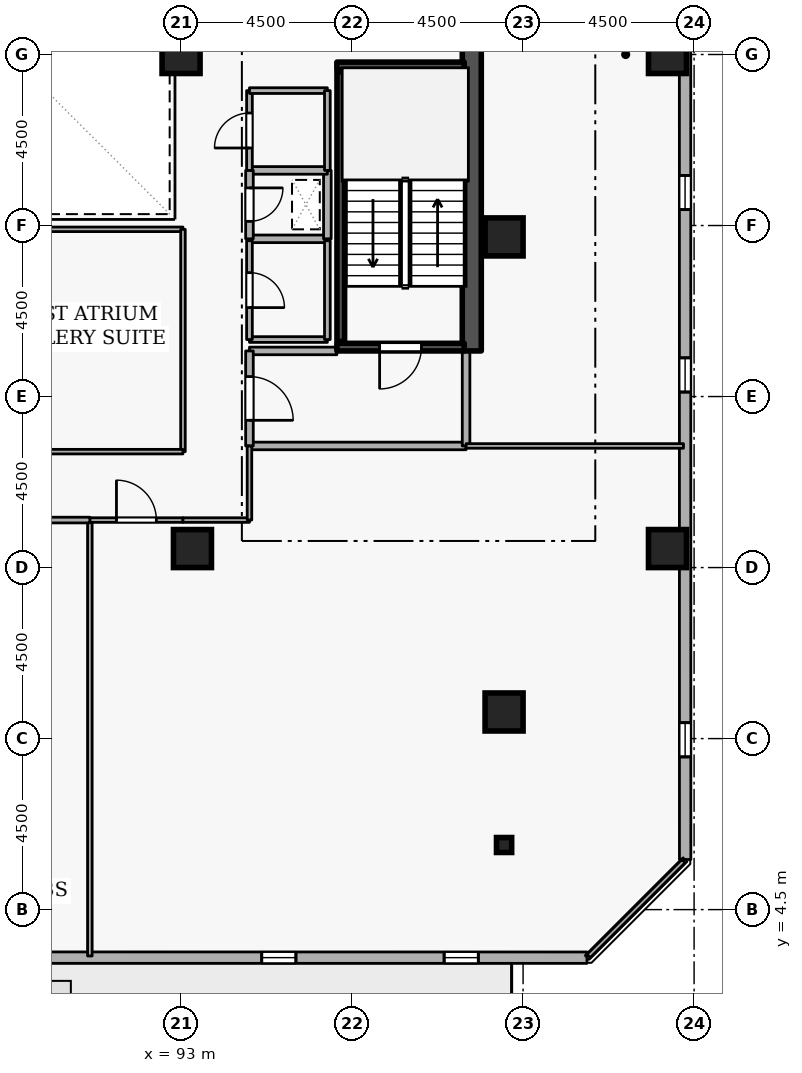
"""IFC4 building model, lengths in metres.
Left out: names, types, materials, properties, quantities, classifications, styles, units other than length and angle.
Written with IfcOpenShell. Run it as: python <this file> out.ifc"""

import sys

from ifc_helpers import new_model, si_unit, direction, frame, frame_2d, origin, origin_2d, place, context, subcontext, project, spatial, rectangle, i_section, extrude, element, fill, save


model = new_model("IFC4")
c1 = context("Model", 3, precision=1e-05, world=origin(), true_north=direction((0.0, 1.0)))
c2 = subcontext(c1, "Body", "Model", "MODEL_VIEW")
j1 = project(units=[si_unit("LENGTHUNIT", "METRE"), si_unit("PLANEANGLEUNIT", "RADIAN")], contexts=[c1])
p1 = place(None, origin())
s1 = spatial("IfcSite", under=j1, at=p1, CompositionType="ELEMENT")
p2 = place(p1, origin())
s2 = spatial("IfcBuilding", under=s1, at=p2, CompositionType="ELEMENT")
p3 = place(p2, frame((0.0, 0.0, 207.3)))
s3 = spatial("IfcBuildingStorey", under=s2, at=p3, CompositionType="ELEMENT", Elevation=207.3)
p4 = place(p3, frame((100.65, 19.2, 0.0), z_axis=(0.0, 0.0, 1.0), x_axis=(0.0, 1.0, 0.0)))
e1 = element("IfcWall", 1, at=p4, inside=s3, PredefinedType="SHEAR", context=c2, shape_type="SweptSolid", body=[
    extrude(rectangle(XDim=15.6, YDim=0.5, at=frame_2d((7.8, 0.0))), origin(), (0.0, 0.0, 1.0), 3.6),
])
for number, where, z_axis, x_axis in (
    (2, (105.8, 14.0, 0.0), (0.0, 0.0, 1.0), (1.0, 0.0, 0.0)),
    (3, (105.8, 27.0, 0.0), (0.0, 0.0, 1.0), (1.0, 0.0, 0.0)),
    (4, (101.5, 9.7, 0.0), (0.0, 0.0, 1.0), (1.0, 0.0, 0.0)),
    (5, (93.3, 14.0, 0.0), (0.0, 0.0, 1.0), (1.0, 0.0, 0.0)),
    (6, (101.5, 22.2, 0.0), (0.0, 0.0, 1.0), (1.0, 0.0, 0.0)),
    (7, (93.0, 27.0, 0.0), (0.0, 0.0, 1.0), (1.0, 0.0, 0.0)),
):
    element("IfcColumn", number, at=place(p3, frame(where, z_axis=z_axis, x_axis=x_axis)), inside=s3, PredefinedType="COLUMN", context=c2, shape_type="SweptSolid", body=[
        extrude(rectangle(XDim=1.0, YDim=1.0, at=origin_2d()), origin(), (0.0, 0.0, 1.0), 3.6),
    ])
p5 = place(p3, frame((101.5, 6.2, 0.0), z_axis=(0.0, 0.0, 1.0), x_axis=(1.0, 0.0, 0.0)))
e8 = element("IfcColumn", 8, at=p5, inside=s3, PredefinedType="COLUMN", context=c2, shape_type="SweptSolid", body=[
    extrude(i_section(OverallWidth=0.399, OverallDepth=0.394, WebThickness=0.023, FlangeThickness=0.037, FilletRadius=0.015, at=origin_2d()), origin(), (0.0, 0.0, 1.0), 3.6),
])
p6 = place(p3, frame((68.422, 3.239, 0.0), z_axis=(0.0, 0.0, 1.0), x_axis=(0.999999994606, -0.000103863011, 0.0)))
e9 = element("IfcWall", 9, at=p6, inside=s3, PredefinedType="STANDARD", context=c2, shape_type="SweptSolid", body=[
    extrude(rectangle(XDim=35.259, YDim=0.3, at=frame_2d((17.629, 0.0))), origin(), (0.0, 0.0, 1.0), 2.7),
])
p7 = place(p6, frame((19.43, 0.0, 0.0)))
e10 = element("IfcOpeningElement", 10, at=p7, cuts=e9, PredefinedType="OPENING", context=c2, shape_type="SweptSolid", body=[
    extrude(rectangle(XDim=1.0, YDim=2.08, at=frame_2d((0.5, 1.04))), frame((0.0, 0.16, 0.0), z_axis=(0.0, -1.0, 0.0), x_axis=(1.0, 0.0, 0.0)), (0.0, 0.0, 1.0), 0.32),
])
p8 = place(p6, frame((2.7, 0.0, 0.72)))
e11 = element("IfcOpeningElement", 11, at=p8, cuts=e9, PredefinedType="OPENING", context=c2, shape_type="SweptSolid", body=[
    extrude(rectangle(XDim=0.9, YDim=1.75, at=frame_2d((0.45, 0.875))), frame((0.0, 0.16, 0.0), z_axis=(0.0, -1.0, 0.0), x_axis=(1.0, 0.0, 0.0)), (0.0, 0.0, 1.0), 0.32),
])
p9 = place(p6, frame((7.5, 0.0, 0.72)))
e12 = element("IfcOpeningElement", 12, at=p9, cuts=e9, PredefinedType="OPENING", context=c2, shape_type="SweptSolid", body=[
    extrude(rectangle(XDim=0.9, YDim=1.75, at=frame_2d((0.45, 0.875))), frame((0.0, 0.16, 0.0), z_axis=(0.0, -1.0, 0.0), x_axis=(1.0, 0.0, 0.0)), (0.0, 0.0, 1.0), 0.32),
])
p10 = place(p6, frame((12.3, 0.0, 0.72)))
e13 = element("IfcOpeningElement", 13, at=p10, cuts=e9, PredefinedType="OPENING", context=c2, shape_type="SweptSolid", body=[
    extrude(rectangle(XDim=0.9, YDim=1.75, at=frame_2d((0.45, 0.875))), frame((0.0, 0.16, 0.0), z_axis=(0.0, -1.0, 0.0), x_axis=(1.0, 0.0, 0.0)), (0.0, 0.0, 1.0), 0.32),
])
p11 = place(p6, frame((26.7, 0.0, 0.72)))
e14 = element("IfcOpeningElement", 14, at=p11, cuts=e9, PredefinedType="OPENING", context=c2, shape_type="SweptSolid", body=[
    extrude(rectangle(XDim=0.9, YDim=1.75, at=frame_2d((0.45, 0.875))), frame((0.0, 0.16, 0.0), z_axis=(0.0, -1.0, 0.0), x_axis=(1.0, 0.0, 0.0)), (0.0, 0.0, 1.0), 0.32),
])
p12 = place(p6, frame((31.5, 0.0, 0.72)))
e15 = element("IfcOpeningElement", 15, at=p12, cuts=e9, PredefinedType="OPENING", context=c2, shape_type="SweptSolid", body=[
    extrude(rectangle(XDim=0.9, YDim=1.75, at=frame_2d((0.45, 0.875))), frame((0.0, 0.16, 0.0), z_axis=(0.0, -1.0, 0.0), x_axis=(1.0, 0.0, 0.0)), (0.0, 0.0, 1.0), 0.32),
])
p13 = place(p3, frame((106.265, 5.819, 0.0), z_axis=(0.0, 0.0, 1.0), x_axis=(-0.000103863011, 0.999999994606, 0.0)))
e16 = element("IfcWall", 16, at=p13, inside=s3, PredefinedType="STANDARD", context=c2, shape_type="SweptSolid", body=[
    extrude(rectangle(XDim=35.259, YDim=0.3, at=frame_2d((17.629, 0.0))), origin(), (0.0, 0.0, 1.0), 2.7),
])
p14 = place(p13, frame((2.7, 0.0, 0.72)))
e17 = element("IfcOpeningElement", 17, at=p14, cuts=e16, PredefinedType="OPENING", context=c2, shape_type="SweptSolid", body=[
    extrude(rectangle(XDim=0.9, YDim=1.75, at=frame_2d((0.45, 0.875))), frame((0.0, 0.16, 0.0), z_axis=(0.0, -1.0, 0.0), x_axis=(1.0, 0.0, 0.0)), (0.0, 0.0, 1.0), 0.32),
])
p15 = place(p13, frame((12.3, 0.0, 0.72)))
e18 = element("IfcOpeningElement", 18, at=p15, cuts=e16, PredefinedType="OPENING", context=c2, shape_type="SweptSolid", body=[
    extrude(rectangle(XDim=0.9, YDim=1.75, at=frame_2d((0.45, 0.875))), frame((0.0, 0.16, 0.0), z_axis=(0.0, -1.0, 0.0), x_axis=(1.0, 0.0, 0.0)), (0.0, 0.0, 1.0), 0.32),
])
p16 = place(p13, frame((17.1, 0.0, 0.72)))
e19 = element("IfcOpeningElement", 19, at=p16, cuts=e16, PredefinedType="OPENING", context=c2, shape_type="SweptSolid", body=[
    extrude(rectangle(XDim=0.9, YDim=1.75, at=frame_2d((0.45, 0.875))), frame((0.0, 0.16, 0.0), z_axis=(0.0, -1.0, 0.0), x_axis=(1.0, 0.0, 0.0)), (0.0, 0.0, 1.0), 0.32),
])
p17 = place(p13, frame((26.7, 0.0, 0.72)))
e20 = element("IfcOpeningElement", 20, at=p17, cuts=e16, PredefinedType="OPENING", context=c2, shape_type="SweptSolid", body=[
    extrude(rectangle(XDim=0.9, YDim=1.75, at=frame_2d((0.45, 0.875))), frame((0.0, 0.16, 0.0), z_axis=(0.0, -1.0, 0.0), x_axis=(1.0, 0.0, 0.0)), (0.0, 0.0, 1.0), 0.32),
])
p18 = place(p3, frame((100.45, 19.3, 0.0), z_axis=(0.0, 0.0, 1.0), x_axis=(-1.0, 0.0, 0.0)))
e21 = element("IfcWall", 21, at=p18, inside=s3, PredefinedType="SHEAR", context=c2, shape_type="SweptSolid", body=[
    extrude(rectangle(XDim=3.35, YDim=0.2, at=frame_2d((1.675, 0.0))), origin(), (0.0, 0.0, 1.0), 3.6),
])
p19 = place(p18, frame((1.125, 0.0, 0.0)))
e22 = element("IfcOpeningElement", 22, at=p19, cuts=e21, PredefinedType="OPENING", context=c2, shape_type="SweptSolid", body=[
    extrude(rectangle(XDim=1.1, YDim=2.1, at=frame_2d((0.55, 1.05))), frame((0.0, 0.11, 0.0), z_axis=(0.0, -1.0, 0.0), x_axis=(1.0, 0.0, 0.0)), (0.0, 0.0, 1.0), 0.22),
])
p20 = place(p3, frame((97.1, 26.7, 0.0), z_axis=(0.0, 0.0, 1.0), x_axis=(1.0, 0.0, 0.0)))
e23 = element("IfcWall", 23, at=p20, inside=s3, PredefinedType="SHEAR", context=c2, shape_type="SweptSolid", body=[
    extrude(rectangle(XDim=3.35, YDim=0.2, at=frame_2d((1.675, 0.0))), origin(), (0.0, 0.0, 1.0), 3.6),
])
p21 = place(p3, frame((97.203, 26.55, 0.0), z_axis=(0.0, 0.0, 1.0), x_axis=(0.0, -1.0, 0.0)))
e24 = element("IfcWall", 24, at=p21, inside=s3, PredefinedType="SHEAR", context=c2, shape_type="SweptSolid", body=[
    extrude(rectangle(XDim=7.1, YDim=0.2, at=frame_2d((3.55, 0.0))), origin(), (0.0, 0.0, 1.0), 3.6),
])
p22 = place(p3, frame((94.8, 16.7, 0.0), z_axis=(0.0, 0.0, 1.0), x_axis=(1.0, 0.0, 0.0)))
e25 = element("IfcWall", 25, at=p22, inside=s3, PredefinedType="STANDARD", context=c2, shape_type="SweptSolid", body=[
    extrude(rectangle(XDim=5.7, YDim=0.2, at=frame_2d((2.85, 0.0))), origin(), (0.0, 0.0, 1.0), 3.34),
])
p23 = place(p3, frame((100.5, 16.7, 0.0), z_axis=(0.0, 0.0, 1.0), x_axis=(0.0, 1.0, 0.0)))
e26 = element("IfcWall", 26, at=p23, inside=s3, PredefinedType="STANDARD", context=c2, shape_type="SweptSolid", body=[
    extrude(rectangle(XDim=2.5, YDim=0.2, at=frame_2d((1.25, 0.0))), origin(), (0.0, 0.0, 1.0), 3.34),
])
p24 = place(p3, frame((97.1, 19.2, 0.0), z_axis=(0.0, 0.0, 1.0), x_axis=(-1.0, 0.0, 0.0)))
e27 = element("IfcWall", 27, at=p24, inside=s3, PredefinedType="STANDARD", context=c2, shape_type="SweptSolid", body=[
    extrude(rectangle(XDim=2.3, YDim=0.2, at=frame_2d((1.15, 0.0))), origin(), (0.0, 0.0, 1.0), 2.545),
])
p25 = place(p3, frame((94.8, 19.2, 0.0), z_axis=(0.0, 0.0, 1.0), x_axis=(0.0, -1.0, 0.0)))
e28 = element("IfcWall", 28, at=p25, inside=s3, PredefinedType="STANDARD", context=c2, shape_type="SweptSolid", body=[
    extrude(rectangle(XDim=2.5, YDim=0.2, at=frame_2d((1.25, 0.0))), origin(), (0.0, 0.0, 1.0), 3.34),
])
p26 = place(p25, frame((0.675, 0.0, 0.0)))
e29 = element("IfcOpeningElement", 29, at=p26, cuts=e28, PredefinedType="OPENING", context=c2, shape_type="SweptSolid", body=[
    extrude(rectangle(XDim=1.15, YDim=2.1, at=frame_2d((0.575, 1.05))), frame((0.0, 0.11, 0.0), z_axis=(0.0, -1.0, 0.0), x_axis=(1.0, 0.0, 0.0)), (0.0, 0.0, 1.0), 0.22),
])
p27 = place(p3, frame((94.8, 22.15, 0.0), z_axis=(0.0, 0.0, 1.0), x_axis=(1.0, 0.0, 0.0)))
e30 = element("IfcWall", 30, at=p27, inside=s3, PredefinedType="STANDARD", context=c2, shape_type="SweptSolid", body=[
    extrude(rectangle(XDim=2.05, YDim=0.2, at=frame_2d((1.025, 0.0))), origin(), (0.0, 0.0, 1.0), 3.34),
])
p28 = place(p3, frame((96.85, 22.15, 0.0), z_axis=(0.0, 0.0, 1.0), x_axis=(0.0, 1.0, 0.0)))
e31 = element("IfcWall", 31, at=p28, inside=s3, PredefinedType="STANDARD", context=c2, shape_type="SweptSolid", body=[
    extrude(rectangle(XDim=1.8, YDim=0.2, at=frame_2d((0.9, 0.0))), origin(), (0.0, 0.0, 1.0), 3.34),
])
p29 = place(p3, frame((96.85, 23.95, 0.0), z_axis=(0.0, 0.0, 1.0), x_axis=(-1.0, 0.0, 0.0)))
e32 = element("IfcWall", 32, at=p29, inside=s3, PredefinedType="STANDARD", context=c2, shape_type="SweptSolid", body=[
    extrude(rectangle(XDim=2.05, YDim=0.2, at=frame_2d((1.025, 0.0))), origin(), (0.0, 0.0, 1.0), 3.34),
])
p30 = place(p3, frame((94.8, 23.95, 0.0), z_axis=(0.0, 0.0, 1.0), x_axis=(0.0, -1.0, 0.0)))
e33 = element("IfcWall", 33, at=p30, inside=s3, PredefinedType="STANDARD", context=c2, shape_type="SweptSolid", body=[
    extrude(rectangle(XDim=1.8, YDim=0.2, at=frame_2d((0.9, 0.0))), origin(), (0.0, 0.0, 1.0), 3.34),
])
p31 = place(p30, frame((0.46, 0.0, 0.0)))
e34 = element("IfcOpeningElement", 34, at=p31, cuts=e33, PredefinedType="OPENING", context=c2, shape_type="SweptSolid", body=[
    extrude(rectangle(XDim=0.88, YDim=2.04, at=frame_2d((0.44, 1.02))), frame((0.0, 0.11, 0.0), z_axis=(0.0, -1.0, 0.0), x_axis=(1.0, 0.0, 0.0)), (0.0, 0.0, 1.0), 0.22),
])
p32 = place(p3, frame((94.8, 19.5, 0.0), z_axis=(0.0, 0.0, 1.0), x_axis=(1.0, 0.0, 0.0)))
e35 = element("IfcWall", 35, at=p32, inside=s3, PredefinedType="PARTITIONING", context=c2, shape_type="SweptSolid", body=[
    extrude(rectangle(XDim=2.05, YDim=0.15, at=frame_2d((1.025, 0.0))), origin(), (0.0, 0.0, 1.0), 2.545),
])
p33 = place(p3, frame((96.85, 19.5, 0.0), z_axis=(0.0, 0.0, 1.0), x_axis=(0.0, 1.0, 0.0)))
e36 = element("IfcWall", 36, at=p33, inside=s3, PredefinedType="PARTITIONING", context=c2, shape_type="SweptSolid", body=[
    extrude(rectangle(XDim=2.6, YDim=0.15, at=frame_2d((1.3, 0.0))), origin(), (0.0, 0.0, 1.0), 3.34),
])
p34 = place(p3, frame((94.8, 22.1, 0.0), z_axis=(0.0, 0.0, 1.0), x_axis=(0.0, -1.0, 0.0)))
e37 = element("IfcWall", 37, at=p34, inside=s3, PredefinedType="PARTITIONING", context=c2, shape_type="SweptSolid", body=[
    extrude(rectangle(XDim=2.6, YDim=0.15, at=frame_2d((1.3, 0.0))), origin(), (0.0, 0.0, 1.0), 3.34),
])
p35 = place(p34, frame((0.84, 0.0, 0.0)))
e38 = element("IfcOpeningElement", 38, at=p35, cuts=e37, PredefinedType="OPENING", context=c2, shape_type="SweptSolid", body=[
    extrude(rectangle(XDim=0.92, YDim=2.08, at=frame_2d((0.46, 1.04))), frame((0.0, 0.085, 0.0), z_axis=(0.0, -1.0, 0.0), x_axis=(1.0, 0.0, 0.0)), (0.0, 0.0, 1.0), 0.17),
])
p36 = place(p3, frame((94.8, 23.95, 0.0), z_axis=(0.0, 0.0, 1.0), x_axis=(0.0, 1.0, 0.0)))
e39 = element("IfcWall", 39, at=p36, inside=s3, PredefinedType="PARTITIONING", context=c2, shape_type="SweptSolid", body=[
    extrude(rectangle(XDim=2.1, YDim=0.15, at=frame_2d((1.05, 0.0))), origin(), (0.0, 0.0, 1.0), 3.34),
])
p37 = place(p36, frame((0.59, 0.0, 0.0)))
e40 = element("IfcOpeningElement", 40, at=p37, cuts=e39, PredefinedType="OPENING", context=c2, shape_type="SweptSolid", body=[
    extrude(rectangle(XDim=0.92, YDim=2.08, at=frame_2d((0.46, 1.04))), frame((0.0, 0.085, 0.0), z_axis=(0.0, -1.0, 0.0), x_axis=(1.0, 0.0, 0.0)), (0.0, 0.0, 1.0), 0.17),
])
p38 = place(p3, frame((94.8, 26.05, 0.0), z_axis=(0.0, 0.0, 1.0), x_axis=(1.0, 0.0, 0.0)))
e41 = element("IfcWall", 41, at=p38, inside=s3, PredefinedType="PARTITIONING", context=c2, shape_type="SweptSolid", body=[
    extrude(rectangle(XDim=2.05, YDim=0.15, at=frame_2d((1.025, 0.0))), origin(), (0.0, 0.0, 1.0), 3.34),
])
p39 = place(p3, frame((96.85, 26.05, 0.0), z_axis=(0.0, 0.0, 1.0), x_axis=(0.0, -1.0, 0.0)))
e42 = element("IfcWall", 42, at=p39, inside=s3, PredefinedType="PARTITIONING", context=c2, shape_type="SweptSolid", body=[
    extrude(rectangle(XDim=2.1, YDim=0.15, at=frame_2d((1.05, 0.0))), origin(), (0.0, 0.0, 1.0), 3.34),
])
p40 = place(p3, frame((90.6, 3.28, 0.0), z_axis=(0.0, 0.0, 1.0), x_axis=(0.0, 1.0, 0.0)))
e43 = element("IfcWall", 43, at=p40, inside=s3, PredefinedType="PARTITIONING", context=c2, shape_type="SweptSolid", body=[
    extrude(rectangle(XDim=11.47, YDim=0.12, at=frame_2d((5.735, 0.0))), origin(), (0.0, 0.0, 1.0), 3.34),
])
p41 = place(p3, frame((90.6, 14.75, 0.0), z_axis=(0.0, 0.0, 1.0), x_axis=(1.0, 0.0, 0.0)))
e44 = element("IfcWall", 44, at=p41, inside=s3, PredefinedType="PARTITIONING", context=c2, shape_type="SweptSolid", body=[
    extrude(rectangle(XDim=2.45, YDim=0.12, at=frame_2d((1.225, 0.0))), origin(), (0.0, 0.0, 1.0), 3.34),
])
p42 = place(p41, frame((0.7, 0.0, 0.0)))
e45 = element("IfcOpeningElement", 45, at=p42, cuts=e44, PredefinedType="OPENING", context=c2, shape_type="SweptSolid", body=[
    extrude(rectangle(XDim=1.05, YDim=2.1, at=frame_2d((0.525, 1.05))), frame((0.0, 0.07, 0.0), z_axis=(0.0, -1.0, 0.0), x_axis=(1.0, 0.0, 0.0)), (0.0, 0.0, 1.0), 0.14),
])
p43 = place(p3, frame((93.05, 14.75, 0.0), z_axis=(0.0, 0.0, 1.0), x_axis=(1.0, 0.0, 0.0)))
e46 = element("IfcWall", 46, at=p43, inside=s3, PredefinedType="PARTITIONING", context=c2, shape_type="SweptSolid", body=[
    extrude(rectangle(XDim=1.75, YDim=0.12, at=frame_2d((0.875, 0.0))), origin(), (0.0, 0.0, 1.0), 3.34),
])
p44 = place(p3, frame((94.8, 14.75, 0.0), z_axis=(0.0, 0.0, 1.0), x_axis=(0.0, 1.0, 0.0)))
e47 = element("IfcWall", 47, at=p44, inside=s3, PredefinedType="PARTITIONING", context=c2, shape_type="SweptSolid", body=[
    extrude(rectangle(XDim=1.95, YDim=0.12, at=frame_2d((0.975, 0.0))), origin(), (0.0, 0.0, 1.0), 3.34),
])
p45 = place(p3, frame((100.5, 16.7, 0.0), z_axis=(0.0, 0.0, 1.0), x_axis=(1.0, 0.0, 0.0)))
e48 = element("IfcWall", 48, at=p45, inside=s3, PredefinedType="PARTITIONING", context=c2, shape_type="SweptSolid", body=[
    extrude(rectangle(XDim=5.72, YDim=0.12, at=frame_2d((2.86, 0.0))), origin(), (0.0, 0.0, 1.0), 3.34),
])
p46 = place(p3, frame((106.22, 5.775, 0.0), z_axis=(0.0, 0.0, 1.0), x_axis=(-0.707106781187, -0.707106781187, 0.0)))
e49 = element("IfcWall", 49, at=p46, inside=s3, PredefinedType="PARTITIONING", context=c2, shape_type="SweptSolid", body=[
    extrude(rectangle(XDim=3.528, YDim=0.12, at=frame_2d((1.764, 0.0))), origin(), (0.0, 0.0, 1.0), 3.34),
])
p47 = place(p3, frame((86.4, 14.75, 0.0), z_axis=(0.0, 0.0, 1.0), x_axis=(1.0, 0.0, 0.0)))
e50 = element("IfcWall", 50, at=p47, inside=s3, PredefinedType="PARTITIONING", context=c2, shape_type="SweptSolid", body=[
    extrude(rectangle(XDim=4.2, YDim=0.15, at=frame_2d((2.1, 0.0))), origin(), (0.0, 0.0, 1.0), 3.34),
])
p48 = place(p47, frame((1.45, 0.0, 0.0)))
e51 = element("IfcOpeningElement", 51, at=p48, cuts=e50, PredefinedType="OPENING", context=c2, shape_type="SweptSolid", body=[
    extrude(rectangle(XDim=1.3, YDim=2.12, at=frame_2d((0.65, 1.06))), frame((0.0, 0.085, 0.0), z_axis=(0.0, -1.0, 0.0), x_axis=(1.0, 0.0, 0.0)), (0.0, 0.0, 1.0), 0.17),
])
p49 = place(p3, frame((83.95, 22.4, 0.0), z_axis=(0.0, 0.0, 1.0), x_axis=(1.0, 0.0, 0.0)))
e52 = element("IfcWall", 52, at=p49, inside=s3, PredefinedType="PARTITIONING", context=c2, shape_type="SweptSolid", body=[
    extrude(rectangle(XDim=9.1, YDim=0.12, at=frame_2d((4.55, 0.0))), origin(), (0.0, 0.0, 1.0), 3.34),
])
p50 = place(p3, frame((93.05, 22.4, 0.0), z_axis=(0.0, 0.0, 1.0), x_axis=(0.0, -1.0, 0.0)))
e53 = element("IfcWall", 53, at=p50, inside=s3, PredefinedType="PARTITIONING", context=c2, shape_type="SweptSolid", body=[
    extrude(rectangle(XDim=5.85, YDim=0.12, at=frame_2d((2.925, 0.0))), origin(), (0.0, 0.0, 1.0), 3.34),
])
p51 = place(p3, frame((93.05, 16.55, 0.0), z_axis=(0.0, 0.0, 1.0), x_axis=(-1.0, 0.0, 0.0)))
e54 = element("IfcWall", 54, at=p51, inside=s3, PredefinedType="PARTITIONING", context=c2, shape_type="SweptSolid", body=[
    extrude(rectangle(XDim=9.1, YDim=0.12, at=frame_2d((4.55, 0.0))), origin(), (0.0, 0.0, 1.0), 3.34),
])
p52 = place(p51, frame((4.075, 0.0, 0.0)))
e55 = element("IfcOpeningElement", 55, at=p52, cuts=e54, PredefinedType="OPENING", context=c2, shape_type="SweptSolid", body=[
    extrude(rectangle(XDim=0.95, YDim=2.1, at=frame_2d((0.475, 1.05))), frame((0.0, 0.07, 0.0), z_axis=(0.0, -1.0, 0.0), x_axis=(1.0, 0.0, 0.0)), (0.0, 0.0, 1.0), 0.14),
])
p53 = place(p11, origin())
e56 = element("IfcWindow", 56, at=p53, inside=s3, PartitioningType="SINGLE_PANEL", PredefinedType="WINDOW", context=c2, shape_type="SweptSolid", body=[
    extrude(rectangle(XDim=0.9, YDim=1.75, at=frame_2d((0.45, 0.875))), frame((0.0, 0.03, 0.0), z_axis=(0.0, -1.0, 0.0), x_axis=(1.0, 0.0, 0.0)), (0.0, 0.0, 1.0), 0.06),
])
fill(e14, e56)
p54 = place(p12, origin())
e57 = element("IfcWindow", 57, at=p54, inside=s3, PartitioningType="SINGLE_PANEL", PredefinedType="WINDOW", context=c2, shape_type="SweptSolid", body=[
    extrude(rectangle(XDim=0.9, YDim=1.75, at=frame_2d((0.45, 0.875))), frame((0.0, 0.03, 0.0), z_axis=(0.0, -1.0, 0.0), x_axis=(1.0, 0.0, 0.0)), (0.0, 0.0, 1.0), 0.06),
])
fill(e15, e57)
p55 = place(p14, origin())
e58 = element("IfcWindow", 58, at=p55, inside=s3, PartitioningType="SINGLE_PANEL", PredefinedType="WINDOW", context=c2, shape_type="SweptSolid", body=[
    extrude(rectangle(XDim=0.9, YDim=1.75, at=frame_2d((0.45, 0.875))), frame((0.0, 0.03, 0.0), z_axis=(0.0, -1.0, 0.0), x_axis=(1.0, 0.0, 0.0)), (0.0, 0.0, 1.0), 0.06),
])
fill(e17, e58)
p56 = place(p15, origin())
e59 = element("IfcWindow", 59, at=p56, inside=s3, PartitioningType="SINGLE_PANEL", PredefinedType="WINDOW", context=c2, shape_type="SweptSolid", body=[
    extrude(rectangle(XDim=0.9, YDim=1.75, at=frame_2d((0.45, 0.875))), frame((0.0, 0.03, 0.0), z_axis=(0.0, -1.0, 0.0), x_axis=(1.0, 0.0, 0.0)), (0.0, 0.0, 1.0), 0.06),
])
fill(e18, e59)
p57 = place(p16, origin())
e60 = element("IfcWindow", 60, at=p57, inside=s3, PartitioningType="SINGLE_PANEL", PredefinedType="WINDOW", context=c2, shape_type="SweptSolid", body=[
    extrude(rectangle(XDim=0.9, YDim=1.75, at=frame_2d((0.45, 0.875))), frame((0.0, 0.03, 0.0), z_axis=(0.0, -1.0, 0.0), x_axis=(1.0, 0.0, 0.0)), (0.0, 0.0, 1.0), 0.06),
])
fill(e19, e60)
p58 = place(p19, origin())
e61 = element("IfcDoor", 61, at=p58, inside=s3, OperationType="SINGLE_SWING_RIGHT", PredefinedType="DOOR", context=c2, shape_type="SweptSolid", body=[
    extrude(rectangle(XDim=1.1, YDim=2.1, at=frame_2d((0.55, 1.05))), frame((0.0, 0.025, 0.0), z_axis=(0.0, -1.0, 0.0), x_axis=(1.0, 0.0, 0.0)), (0.0, 0.0, 1.0), 0.05),
])
fill(e22, e61)
p59 = place(p26, origin())
e62 = element("IfcDoor", 62, at=p59, inside=s3, OperationType="SINGLE_SWING_RIGHT", PredefinedType="DOOR", context=c2, shape_type="SweptSolid", body=[
    extrude(rectangle(XDim=1.15, YDim=2.1, at=frame_2d((0.575, 1.05))), frame((0.0, 0.025, 0.0), z_axis=(0.0, -1.0, 0.0), x_axis=(1.0, 0.0, 0.0)), (0.0, 0.0, 1.0), 0.05),
])
fill(e29, e62)
p60 = place(p31, origin())
e63 = element("IfcDoor", 63, at=p60, inside=s3, OperationType="SINGLE_SWING_LEFT", PredefinedType="DOOR", context=c2, shape_type="SweptSolid", body=[
    extrude(rectangle(XDim=0.88, YDim=2.04, at=frame_2d((0.44, 1.02))), frame((0.0, 0.025, 0.0), z_axis=(0.0, -1.0, 0.0), x_axis=(1.0, 0.0, 0.0)), (0.0, 0.0, 1.0), 0.05),
])
fill(e34, e63)
p61 = place(p35, origin())
e64 = element("IfcDoor", 64, at=p61, inside=s3, OperationType="SINGLE_SWING_RIGHT", PredefinedType="DOOR", context=c2, shape_type="SweptSolid", body=[
    extrude(rectangle(XDim=0.92, YDim=2.08, at=frame_2d((0.46, 1.04))), frame((0.0, 0.025, 0.0), z_axis=(0.0, -1.0, 0.0), x_axis=(1.0, 0.0, 0.0)), (0.0, 0.0, 1.0), 0.05),
])
fill(e38, e64)
p62 = place(p37, origin())
e65 = element("IfcDoor", 65, at=p62, inside=s3, OperationType="SINGLE_SWING_LEFT", PredefinedType="DOOR", context=c2, shape_type="SweptSolid", body=[
    extrude(rectangle(XDim=0.92, YDim=2.08, at=frame_2d((0.46, 1.04))), frame((0.0, 0.025, 0.0), z_axis=(0.0, -1.0, 0.0), x_axis=(1.0, 0.0, 0.0)), (0.0, 0.0, 1.0), 0.05),
])
fill(e40, e65)
p63 = place(p42, origin())
e66 = element("IfcDoor", 66, at=p63, inside=s3, OperationType="SINGLE_SWING_LEFT", PredefinedType="DOOR", context=c2, shape_type="SweptSolid", body=[
    extrude(rectangle(XDim=1.05, YDim=2.1, at=frame_2d((0.525, 1.05))), frame((0.0, 0.025, 0.0), z_axis=(0.0, -1.0, 0.0), x_axis=(1.0, 0.0, 0.0)), (0.0, 0.0, 1.0), 0.05),
])
fill(e45, e66)
save(model, sys.argv[1])
